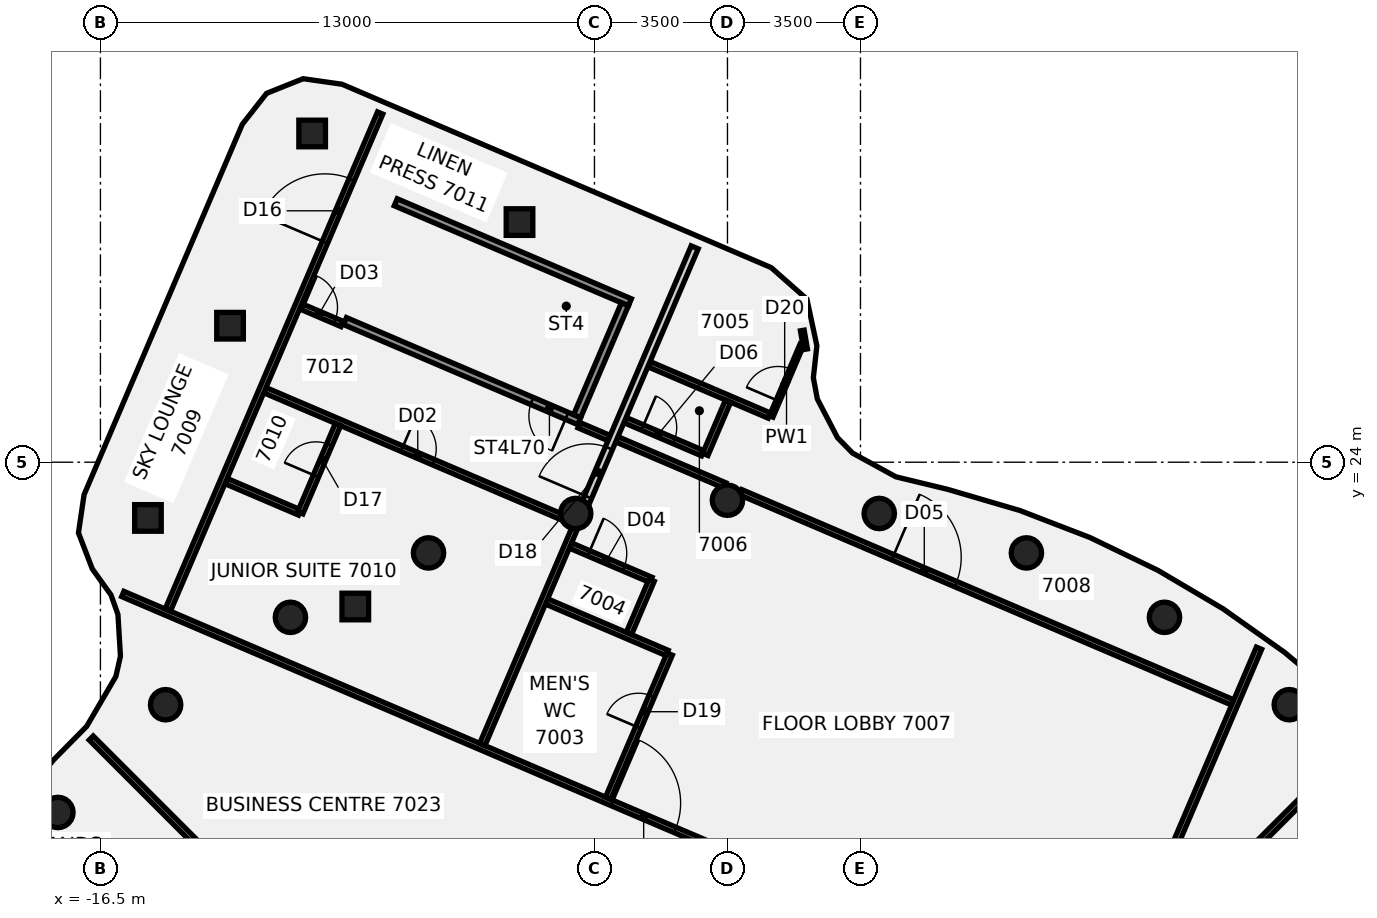
"""IFC4 building model, lengths in metres.
Left out: names, types, materials, properties, quantities, classifications, styles, units other than length and angle.
Written with IfcOpenShell. Run it as: python <this file> out.ifc"""

import sys

from ifc_helpers import new_model, si_unit, direction, frame, frame_2d, origin, origin_2d, place, context, subcontext, project, spatial, polyline, rectangle, circle, outline, extrude, element, fill, save


model = new_model("IFC4")
c1 = context("Model", 3, precision=1e-05, world=origin(), true_north=direction((0.0, 1.0)))
c2 = subcontext(c1, "Body", "Model", "MODEL_VIEW")
j1 = project(units=[si_unit("LENGTHUNIT", "METRE"), si_unit("PLANEANGLEUNIT", "RADIAN")], contexts=[c1])
p1 = place(None, origin())
s1 = spatial("IfcSite", under=j1, at=p1, CompositionType="ELEMENT")
p2 = place(p1, origin())
s2 = spatial("IfcBuilding", under=s1, at=p2, CompositionType="ELEMENT")
p3 = place(p2, frame((0.0, 0.0, 274.8)))
s3 = spatial("IfcBuildingStorey", under=s2, at=p3, CompositionType="ELEMENT", Elevation=274.8)
for number, where, z_axis, x_axis in (
    (1, (14.784, 17.619, -0.14), (0.0, 0.0, 1.0), (1.0, 0.0, 0.0)),
    (2, (11.5, 19.919, -0.14), (0.0, 0.0, 1.0), (1.0, 0.0, 0.0)),
    (3, (7.866, 21.613, -0.14), (0.0, 0.0, 1.0), (1.0, 0.0, 0.0)),
    (4, (3.994, 22.651, -0.14), (0.0, 0.0, 1.0), (1.0, 0.0, 0.0)),
    (5, (0.0, 23.0, -0.14), (0.0, 0.0, 1.0), (1.0, 0.0, 0.0)),
    (6, (-3.994, 22.651, -0.14), (0.0, 0.0, 1.0), (1.0, 0.0, 0.0)),
    (7, (-7.866, 21.613, -0.14), (0.0, 0.0, 1.0), (1.0, 0.0, 0.0)),
    (8, (-11.5, 19.919, -0.14), (0.0, 0.0, 1.0), (1.0, 0.0, 0.0)),
    (9, (-14.784, 17.619, -0.14), (0.0, 0.0, 1.0), (1.0, 0.0, 0.0)),
    (10, (-17.619, 14.784, -0.14), (0.0, 0.0, 1.0), (1.0, 0.0, 0.0)),
):
    element("IfcColumn", number, at=place(p3, frame(where, z_axis=z_axis, x_axis=x_axis)), inside=s3, PredefinedType="COLUMN", context=c2, shape_type="SweptSolid", body=[
        extrude(circle(Radius=0.4, at=origin_2d()), origin(), (0.0, 0.0, 1.0), 3.56),
    ])
p4 = place(p3, frame((-9.793, 20.203, -0.139), z_axis=(0.00968280735, -0.049993501778, 0.998702604894), x_axis=(0.392404503784, 0.918824615381, 0.042190420475)))
e11 = element("IfcColumn", 11, at=p4, inside=s3, PredefinedType="COLUMN", context=c2, shape_type="SweptSolid", body=[
    extrude(rectangle(XDim=0.7, YDim=0.7, at=origin_2d()), origin(), (0.0, 0.0, 1.0), 3.555),
])
p5 = place(p3, frame((-5.472, 30.319, -0.139), z_axis=(-0.042304996766, -0.02843225432, 0.998700102214), x_axis=(0.919317607223, -0.392535504422, 0.02776715357)))
e12 = element("IfcColumn", 12, at=p5, inside=s3, PredefinedType="COLUMN", context=c2, shape_type="SweptSolid", body=[
    extrude(rectangle(XDim=0.7, YDim=0.7, at=origin_2d()), origin(), (0.0, 0.0, 1.0), 3.555),
])
p6 = place(p3, frame((-10.928, 32.649, -0.137), z_axis=(0.039199198447, -0.093913316068, 0.994808379491), x_axis=(0.394304854241, 0.916236072935, 0.07095872445)))
e13 = element("IfcColumn", 13, at=p6, inside=s3, PredefinedType="COLUMN", context=c2, shape_type="SweptSolid", body=[
    extrude(rectangle(XDim=0.7, YDim=0.7, at=origin_2d()), origin(), (0.0, 0.0, 1.0), 3.556),
])
p7 = place(p3, frame((-13.089, 27.592, -0.137), z_axis=(0.064865598105, -0.104414454334, 0.992416281562), x_axis=(0.395430388094, 0.91578583263, 0.070506148144)))
e14 = element("IfcColumn", 14, at=p7, inside=s3, PredefinedType="COLUMN", context=c2, shape_type="SweptSolid", body=[
    extrude(rectangle(XDim=0.7, YDim=0.7, at=origin_2d()), origin(), (0.0, 0.0, 1.0), 3.568),
])
p8 = place(p3, frame((-15.25, 22.534, -0.137), z_axis=(0.09044064582, -0.114839855468, 0.98925845823), x_axis=(0.396148848122, 0.915509402061, 0.070061579126)))
e15 = element("IfcColumn", 15, at=p8, inside=s3, PredefinedType="COLUMN", context=c2, shape_type="SweptSolid", body=[
    extrude(rectangle(XDim=0.7, YDim=0.7, at=origin_2d()), origin(), (0.0, 0.0, 1.0), 3.582),
])
p9 = place(p3, frame((-16.743, 16.743, 0.0), z_axis=(0.0, 0.0, 1.0), x_axis=(0.707106781187, -0.707106781187, 0.0)))
e16 = element("IfcWall", 16, at=p9, inside=s3, PredefinedType="PARTITIONING", context=c2, shape_type="SweptSolid", body=[
    extrude(rectangle(XDim=6.694, YDim=0.15, at=frame_2d((3.347, 0.0))), origin(), (0.0, 0.0, 1.0), 2.824),
])
p10 = place(p3, frame((-15.911, 20.533, 0.0), z_axis=(0.0, 0.0, 1.0), x_axis=(0.919595802133, -0.392865830405, 0.0)))
e17 = element("IfcWall", 17, at=p10, inside=s3, PredefinedType="PARTITIONING", context=c2, shape_type="SweptSolid", body=[
    extrude(rectangle(XDim=21.654, YDim=0.15, at=frame_2d((10.827, 0.0))), origin(), (0.0, 0.0, 1.0), 2.824),
])
p11 = place(p10, frame((14.005, 0.0, 0.0)))
e18 = element("IfcOpeningElement", 18, at=p11, cuts=e17, PredefinedType="OPENING", context=c2, shape_type="SweptSolid", body=[
    extrude(rectangle(XDim=1.8, YDim=2.1, at=frame_2d((0.9, 1.05))), frame((0.0, 0.085, 0.0), z_axis=(0.0, -1.0, 0.0), x_axis=(1.0, 0.0, 0.0)), (0.0, 0.0, 1.0), 0.17),
])
p12 = place(p3, frame((-13.195, 23.504, 0.0), z_axis=(0.0, 0.0, 1.0), x_axis=(0.919678202956, -0.392672895687, 0.0)))
e19 = element("IfcWall", 19, at=p12, inside=s3, PredefinedType="PARTITIONING", context=c2, shape_type="SweptSolid", body=[
    extrude(rectangle(XDim=2.104, YDim=0.15, at=frame_2d((1.052, 0.0))), origin(), (0.0, 0.0, 1.0), 2.824),
])
p13 = place(p3, frame((-12.173, 25.896, 0.0), z_axis=(0.0, 0.0, 1.0), x_axis=(0.919645111199, -0.392750390767, 0.0)))
e20 = element("IfcWall", 20, at=p13, inside=s3, PredefinedType="PARTITIONING", context=c2, shape_type="SweptSolid", body=[
    extrude(rectangle(XDim=8.472, YDim=0.15, at=frame_2d((4.236, 0.0))), origin(), (0.0, 0.0, 1.0), 2.824),
])
p14 = place(p13, frame((3.925, 0.0, 0.0)))
e21 = element("IfcOpeningElement", 21, at=p14, cuts=e20, PredefinedType="OPENING", context=c2, shape_type="SweptSolid", body=[
    extrude(rectangle(XDim=0.9, YDim=2.1, at=frame_2d((0.45, 1.05))), frame((0.0, 0.085, 0.0), z_axis=(0.0, -1.0, 0.0), x_axis=(1.0, 0.0, 0.0)), (0.0, 0.0, 1.0), 0.17),
])
p15 = place(p3, frame((-11.23, 28.103, 0.0), z_axis=(0.0, 0.0, 1.0), x_axis=(0.919613431155, -0.392824562927, 0.0)))
e22 = element("IfcWall", 22, at=p15, inside=s3, PredefinedType="PARTITIONING", context=c2, shape_type="SweptSolid", body=[
    extrude(rectangle(XDim=1.185, YDim=0.15, at=frame_2d((0.592, 0.0))), origin(), (0.0, 0.0, 1.0), 2.824),
])
p16 = place(p15, frame((0.075, 0.0, 0.0)))
e23 = element("IfcOpeningElement", 23, at=p16, cuts=e22, PredefinedType="OPENING", context=c2, shape_type="SweptSolid", body=[
    extrude(rectangle(XDim=0.9, YDim=2.1, at=frame_2d((0.45, 1.05))), frame((0.0, 0.085, 0.0), z_axis=(0.0, -1.0, 0.0), x_axis=(1.0, 0.0, 0.0)), (0.0, 0.0, 1.0), 0.17),
])
p17 = place(p3, frame((-3.906, 24.973, 0.0), z_axis=(0.0, 0.0, 1.0), x_axis=(0.919526501885, -0.393028004512, 0.0)))
e24 = element("IfcWall", 24, at=p17, inside=s3, PredefinedType="PARTITIONING", context=c2, shape_type="SweptSolid", body=[
    extrude(rectangle(XDim=0.86, YDim=0.15, at=frame_2d((0.43, 0.0))), origin(), (0.0, 0.0, 1.0), 2.824),
])
p18 = place(p3, frame((-4.761, 20.336, 0.0), z_axis=(0.0, 0.0, 1.0), x_axis=(0.91960570613, -0.392842646938, 0.0)))
e25 = element("IfcWall", 25, at=p18, inside=s3, PredefinedType="PARTITIONING", context=c2, shape_type="SweptSolid", body=[
    extrude(rectangle(XDim=3.449, YDim=0.15, at=frame_2d((1.725, 0.0))), origin(), (0.0, 0.0, 1.0), 2.824),
])
p19 = place(p3, frame((-4.128, 21.807, 0.0), z_axis=(0.0, 0.0, 1.0), x_axis=(0.919556307153, -0.392958264929, 0.0)))
e26 = element("IfcWall", 26, at=p19, inside=s3, PredefinedType="PARTITIONING", context=c2, shape_type="SweptSolid", body=[
    extrude(rectangle(XDim=2.3, YDim=0.15, at=frame_2d((1.15, 0.0))), origin(), (0.0, 0.0, 1.0), 2.824),
])
p20 = place(p19, frame((0.52, 0.0, 0.0)))
e27 = element("IfcOpeningElement", 27, at=p20, cuts=e26, PredefinedType="OPENING", context=c2, shape_type="SweptSolid", body=[
    extrude(rectangle(XDim=1.0, YDim=2.1, at=frame_2d((0.5, 1.05))), frame((0.0, 0.085, 0.0), z_axis=(0.0, -1.0, 0.0), x_axis=(1.0, 0.0, 0.0)), (0.0, 0.0, 1.0), 0.17),
])
p21 = place(p3, frame((-2.911, 24.603, 0.0), z_axis=(0.0, 0.0, 1.0), x_axis=(0.919582336427, -0.392897348593, 0.0)))
e28 = element("IfcWall", 28, at=p21, inside=s3, PredefinedType="PARTITIONING", context=c2, shape_type="SweptSolid", body=[
    extrude(rectangle(XDim=3.086, YDim=0.15, at=frame_2d((1.543, 0.0))), origin(), (0.0, 0.0, 1.0), 2.824),
])
p22 = place(p3, frame((0.351, 23.209, 0.0), z_axis=(0.0, 0.0, 1.0), x_axis=(0.919588500122, -0.392882922056, 0.0)))
e29 = element("IfcWall", 29, at=p22, inside=s3, PredefinedType="PARTITIONING", context=c2, shape_type="SweptSolid", body=[
    extrude(rectangle(XDim=14.077, YDim=0.15, at=frame_2d((7.038, 0.0))), origin(), (0.0, 0.0, 1.0), 2.824),
])
p23 = place(p22, frame((4.35, 0.0, 0.0)))
e30 = element("IfcOpeningElement", 30, at=p23, cuts=e29, PredefinedType="OPENING", context=c2, shape_type="SweptSolid", body=[
    extrude(rectangle(XDim=1.8, YDim=2.1, at=frame_2d((0.9, 1.05))), frame((0.0, 0.085, 0.0), z_axis=(0.0, -1.0, 0.0), x_axis=(1.0, 0.0, 0.0)), (0.0, 0.0, 1.0), 0.17),
])
p24 = place(p3, frame((-2.695, 25.109, 0.0), z_axis=(0.0, 0.0, 1.0), x_axis=(0.919571099673, -0.392923647349, 0.0)))
e31 = element("IfcWall", 31, at=p24, inside=s3, PredefinedType="PARTITIONING", context=c2, shape_type="SweptSolid", body=[
    extrude(rectangle(XDim=2.22, YDim=0.15, at=frame_2d((1.11, 0.0))), origin(), (0.0, 0.0, 1.0), 2.824),
])
p25 = place(p24, frame((0.5, 0.0, 0.0)))
e32 = element("IfcOpeningElement", 32, at=p25, cuts=e31, PredefinedType="OPENING", context=c2, shape_type="SweptSolid", body=[
    extrude(rectangle(XDim=0.9, YDim=2.1, at=frame_2d((0.45, 1.05))), frame((0.0, 0.085, 0.0), z_axis=(0.0, -1.0, 0.0), x_axis=(1.0, 0.0, 0.0)), (0.0, 0.0, 1.0), 0.17),
])
p26 = place(p3, frame((-2.062, 26.579, 0.0), z_axis=(0.0, 0.0, 1.0), x_axis=(0.919588532032, -0.392882847366, 0.0)))
e33 = element("IfcWall", 33, at=p26, inside=s3, PredefinedType="PARTITIONING", context=c2, shape_type="SweptSolid", body=[
    extrude(rectangle(XDim=3.441, YDim=0.15, at=frame_2d((1.72, 0.0))), origin(), (0.0, 0.0, 1.0), 2.824),
])
p27 = place(p3, frame((12.01, 12.01, 0.0), z_axis=(0.0, 0.0, 1.0), x_axis=(0.707106781187, 0.707106781187, 0.0)))
e34 = element("IfcWall", 34, at=p27, inside=s3, PredefinedType="PARTITIONING", context=c2, shape_type="SweptSolid", body=[
    extrude(rectangle(XDim=6.691, YDim=0.15, at=frame_2d((3.345, 0.0))), origin(), (0.0, 0.0, 1.0), 2.824),
])
p28 = place(p3, frame((-14.728, 20.109, 0.0), z_axis=(0.0, 0.0, 1.0), x_axis=(0.392937170338, 0.919565321316, 0.0)))
e35 = element("IfcWall", 35, at=p28, inside=s3, PredefinedType="PARTITIONING", context=c2, shape_type="SweptSolid", body=[
    extrude(rectangle(XDim=14.224, YDim=0.15, at=frame_2d((7.112, 0.0))), origin(), (0.0, 0.0, 1.0), 2.824),
])
p29 = place(p28, frame((10.525, 0.0, 0.0)))
e36 = element("IfcOpeningElement", 36, at=p29, cuts=e35, PredefinedType="OPENING", context=c2, shape_type="SweptSolid", body=[
    extrude(rectangle(XDim=1.8, YDim=2.1, at=frame_2d((0.9, 1.05))), frame((0.0, 0.085, 0.0), z_axis=(0.0, -1.0, 0.0), x_axis=(1.0, 0.0, 0.0)), (0.0, 0.0, 1.0), 0.17),
])
p30 = place(p3, frame((-11.241, 22.67, 0.0), z_axis=(0.0, 0.0, 1.0), x_axis=(0.3930089689, 0.919534637936, 0.0)))
e37 = element("IfcWall", 37, at=p30, inside=s3, PredefinedType="PARTITIONING", context=c2, shape_type="SweptSolid", body=[
    extrude(rectangle(XDim=2.525, YDim=0.15, at=frame_2d((1.263, 0.0))), origin(), (0.0, 0.0, 1.0), 2.824),
])
p31 = place(p30, frame((1.05, 0.0, 0.0)))
e38 = element("IfcOpeningElement", 38, at=p31, cuts=e37, PredefinedType="OPENING", context=c2, shape_type="SweptSolid", body=[
    extrude(rectangle(XDim=0.9, YDim=2.1, at=frame_2d((0.45, 1.05))), frame((0.0, 0.085, 0.0), z_axis=(0.0, -1.0, 0.0), x_axis=(1.0, 0.0, 0.0)), (0.0, 0.0, 1.0), 0.17),
])
p32 = place(p3, frame((-6.45, 16.573, 0.0), z_axis=(0.0, 0.0, 1.0), x_axis=(0.392889649243, 0.919585625985, 0.0)))
e39 = element("IfcWall", 39, at=p32, inside=s3, PredefinedType="PARTITIONING", context=c2, shape_type="SweptSolid", body=[
    extrude(rectangle(XDim=6.326, YDim=0.15, at=frame_2d((3.163, 0.0))), origin(), (0.0, 0.0, 1.0), 2.824),
])
p33 = place(p3, frame((-3.788, 22.804, 0.0), z_axis=(0.0, 0.0, 1.0), x_axis=(0.392862746148, 0.91959711977, 0.0)))
e40 = element("IfcWall", 40, at=p33, inside=s3, PredefinedType="PARTITIONING", context=c2, shape_type="SweptSolid", body=[
    extrude(rectangle(XDim=7.448, YDim=0.2, at=frame_2d((3.724, 0.0))), origin(), (0.0, 0.0, 1.0), 2.824),
])
p34 = place(p33, frame((0.303, 0.0, 0.0)))
e41 = element("IfcOpeningElement", 41, at=p34, cuts=e40, PredefinedType="OPENING", context=c2, shape_type="SweptSolid", body=[
    extrude(rectangle(XDim=1.4, YDim=2.1, at=frame_2d((0.7, 1.05))), frame((0.0, 0.11, 0.0), z_axis=(0.0, -1.0, 0.0), x_axis=(1.0, 0.0, 0.0)), (0.0, 0.0, 1.0), 0.22),
])
p35 = place(p3, frame((-3.14, 15.159, 0.0), z_axis=(0.0, 0.0, 1.0), x_axis=(0.392854606295, 0.919600597168, 0.0)))
e42 = element("IfcWall", 42, at=p35, inside=s3, PredefinedType="PARTITIONING", context=c2, shape_type="SweptSolid", body=[
    extrude(rectangle(XDim=4.125, YDim=0.15, at=frame_2d((2.062, 0.0))), origin(), (0.0, 0.0, 1.0), 2.824),
])
p36 = place(p35, frame((2.025, 0.0, 0.0)))
e43 = element("IfcOpeningElement", 43, at=p36, cuts=e42, PredefinedType="OPENING", context=c2, shape_type="SweptSolid", body=[
    extrude(rectangle(XDim=0.9, YDim=2.1, at=frame_2d((0.45, 1.05))), frame((0.0, 0.085, 0.0), z_axis=(0.0, -1.0, 0.0), x_axis=(1.0, 0.0, 0.0)), (0.0, 0.0, 1.0), 0.17),
])
p37 = place(p3, frame((1.152, 25.205, 0.0), z_axis=(0.0, 0.0, 1.0), x_axis=(0.392869839525, 0.919594089363, 0.0)))
e44 = element("IfcWall", 44, at=p37, inside=s3, PredefinedType="PARTITIONING", context=c2, shape_type="SweptSolid", body=[
    extrude(rectangle(XDim=2.05, YDim=0.1, at=frame_2d((1.025, 0.0))), origin(), (0.0, 0.0, 1.0), 2.824),
])
p38 = place(p37, frame((0.45, 0.0, 0.0)))
e45 = element("IfcOpeningElement", 45, at=p38, cuts=e44, PredefinedType="OPENING", context=c2, shape_type="SweptSolid", body=[
    extrude(rectangle(XDim=0.9, YDim=2.1, at=frame_2d((0.45, 1.05))), frame((0.0, 0.06, 0.0), z_axis=(0.0, -1.0, 0.0), x_axis=(1.0, 0.0, 0.0)), (0.0, 0.0, 1.0), 0.12),
])
p39 = place(p3, frame((-2.592, 19.497, 0.0), z_axis=(0.0, 0.0, 1.0), x_axis=(0.39231007283, 0.919833031999, 0.0)))
e46 = element("IfcWall", 46, at=p39, inside=s3, PredefinedType="PARTITIONING", context=c2, shape_type="SweptSolid", body=[
    extrude(rectangle(XDim=1.52, YDim=0.15, at=frame_2d((0.76, 0.0))), origin(), (0.0, 0.0, 1.0), 2.824),
])
p40 = place(p3, frame((-0.583, 24.206, 0.0), z_axis=(0.0, 0.0, 1.0), x_axis=(0.392489240169, 0.919756596253, 0.0)))
e47 = element("IfcWall", 47, at=p40, inside=s3, PredefinedType="PARTITIONING", context=c2, shape_type="SweptSolid", body=[
    extrude(rectangle(XDim=1.525, YDim=0.15, at=frame_2d((0.763, 0.0))), origin(), (0.0, 0.0, 1.0), 2.824),
])
p41 = place(p3, frame((10.946, 11.987, 0.0), z_axis=(0.0, 0.0, 1.0), x_axis=(0.392849254325, 0.919602883519, 0.0)))
e48 = element("IfcWall", 48, at=p41, inside=s3, PredefinedType="PARTITIONING", context=c2, shape_type="SweptSolid", body=[
    extrude(rectangle(XDim=7.74, YDim=0.15, at=frame_2d((3.87, 0.0))), origin(), (0.0, 0.0, 1.0), 2.824),
])
p42 = place(p3, frame((2.054, 26.973, 0.0), z_axis=(0.0, 0.0, 1.0), x_axis=(-0.168516403879, 0.985698849357, 0.0)))
e49 = element("IfcWall", 49, at=p42, inside=s3, PredefinedType="PARTITIONING", context=c2, shape_type="SweptSolid", body=[
    extrude(rectangle(XDim=0.5, YDim=0.1, at=frame_2d((0.25, 0.0))), origin(), (0.0, 0.0, 1.0), 2.824),
])
p43 = place(p3, frame((-3.903, 25.081, -0.14), z_axis=(0.0, 0.0, 1.0), x_axis=(-0.919604285577, 0.392845972295, 0.0)))
e50 = element("IfcWall", 50, at=p43, inside=s3, PredefinedType="SHEAR", context=c2, shape_type="SweptSolid", body=[
    extrude(rectangle(XDim=6.7, YDim=0.2, at=frame_2d((3.35, 0.0))), origin(), (0.0, 0.0, 1.0), 3.064),
])
p44 = place(p43, frame((0.35, 0.0, 0.0)))
e51 = element("IfcOpeningElement", 51, at=p44, cuts=e50, PredefinedType="OPENING", context=c2, shape_type="SweptSolid", body=[
    extrude(rectangle(XDim=1.0, YDim=2.1, at=frame_2d((0.5, 1.05))), frame((0.0, 0.11, 0.0), z_axis=(0.0, -1.0, 0.0), x_axis=(1.0, 0.0, 0.0)), (0.0, 0.0, 1.0), 0.22),
])
p45 = place(p3, frame((-2.568, 28.208, -0.14), z_axis=(0.0, 0.0, 1.0), x_axis=(-0.919604285577, 0.392845972295, 0.0)))
e52 = element("IfcWall", 52, at=p45, inside=s3, PredefinedType="SHEAR", context=c2, shape_type="SweptSolid", body=[
    extrude(rectangle(XDim=6.7, YDim=0.2, at=frame_2d((3.35, 0.0))), origin(), (0.0, 0.0, 1.0), 3.064),
])
p46 = place(p3, frame((-2.699, 28.155, -0.14), z_axis=(0.0, 0.0, 1.0), x_axis=(-0.392823319404, -0.919613962341, 0.0)))
e53 = element("IfcWall", 53, at=p46, inside=s3, PredefinedType="SHEAR", context=c2, shape_type="SweptSolid", body=[
    extrude(rectangle(XDim=3.2, YDim=0.2, at=frame_2d((1.6, 0.0))), origin(), (0.0, 0.0, 1.0), 3.56),
])
p47 = place(p3, frame((0.0, 0.0, -0.14)))
e54 = element("IfcWall", 54, at=p47, inside=s3, PredefinedType="SHEAR", context=c2, shape_type="SweptSolid", body=[
    extrude(outline(polyline([(-8.584, 30.669), (-8.768, 30.748), (-10.025, 27.805), (-9.841, 27.727), (-8.584, 30.669)])), origin(), (0.0, 0.0, 1.0), 3.56),
])
p48 = place(p11, origin())
e55 = element("IfcDoor", 55, at=p48, inside=s3, OperationType="DOUBLE_DOOR_SINGLE_SWING", PredefinedType="DOOR", context=c2, shape_type="SweptSolid", body=[
    extrude(rectangle(XDim=1.8, YDim=2.1, at=frame_2d((0.9, 1.05))), frame((0.0, 0.025, 0.0), z_axis=(0.0, -1.0, 0.0), x_axis=(1.0, 0.0, 0.0)), (0.0, 0.0, 1.0), 0.05),
])
fill(e18, e55)
p49 = place(p14, frame((0.9, 0.0, 0.0), z_axis=(0.0, 0.0, 1.0), x_axis=(-1.0, 0.0, 0.0)))
e56 = element("IfcDoor", 56, at=p49, inside=s3, OperationType="SINGLE_SWING_RIGHT", PredefinedType="DOOR", context=c2, shape_type="SweptSolid", body=[
    extrude(rectangle(XDim=0.9, YDim=2.1, at=frame_2d((0.45, 1.05))), frame((0.0, 0.025, 0.0), z_axis=(0.0, -1.0, 0.0), x_axis=(1.0, 0.0, 0.0)), (0.0, 0.0, 1.0), 0.05),
])
fill(e21, e56)
p50 = place(p16, origin())
e57 = element("IfcDoor", 57, at=p50, inside=s3, OperationType="SINGLE_SWING_RIGHT", PredefinedType="DOOR", context=c2, shape_type="SweptSolid", body=[
    extrude(rectangle(XDim=0.9, YDim=2.1, at=frame_2d((0.45, 1.05))), frame((0.0, 0.025, 0.0), z_axis=(0.0, -1.0, 0.0), x_axis=(1.0, 0.0, 0.0)), (0.0, 0.0, 1.0), 0.05),
])
fill(e23, e57)
p51 = place(p20, frame((1.0, 0.0, 0.0), z_axis=(0.0, 0.0, 1.0), x_axis=(-1.0, 0.0, 0.0)))
e58 = element("IfcDoor", 58, at=p51, inside=s3, OperationType="SINGLE_SWING_LEFT", PredefinedType="DOOR", context=c2, shape_type="SweptSolid", body=[
    extrude(rectangle(XDim=1.0, YDim=2.1, at=frame_2d((0.5, 1.05))), frame((0.0, 0.025, 0.0), z_axis=(0.0, -1.0, 0.0), x_axis=(1.0, 0.0, 0.0)), (0.0, 0.0, 1.0), 0.05),
])
fill(e27, e58)
p52 = place(p23, origin())
e59 = element("IfcDoor", 59, at=p52, inside=s3, OperationType="DOUBLE_DOOR_SINGLE_SWING", PredefinedType="DOOR", context=c2, shape_type="SweptSolid", body=[
    extrude(rectangle(XDim=1.8, YDim=2.1, at=frame_2d((0.9, 1.05))), frame((0.0, 0.025, 0.0), z_axis=(0.0, -1.0, 0.0), x_axis=(1.0, 0.0, 0.0)), (0.0, 0.0, 1.0), 0.05),
])
fill(e30, e59)
p53 = place(p25, origin())
e60 = element("IfcDoor", 60, at=p53, inside=s3, OperationType="SINGLE_SWING_RIGHT", PredefinedType="DOOR", context=c2, shape_type="SweptSolid", body=[
    extrude(rectangle(XDim=0.9, YDim=2.1, at=frame_2d((0.45, 1.05))), frame((0.0, 0.025, 0.0), z_axis=(0.0, -1.0, 0.0), x_axis=(1.0, 0.0, 0.0)), (0.0, 0.0, 1.0), 0.05),
])
fill(e32, e60)
p54 = place(p29, origin())
e61 = element("IfcDoor", 61, at=p54, inside=s3, OperationType="DOUBLE_DOOR_SINGLE_SWING", PredefinedType="DOOR", context=c2, shape_type="SweptSolid", body=[
    extrude(rectangle(XDim=1.8, YDim=2.1, at=frame_2d((0.9, 1.05))), frame((0.0, 0.025, 0.0), z_axis=(0.0, -1.0, 0.0), x_axis=(1.0, 0.0, 0.0)), (0.0, 0.0, 1.0), 0.05),
])
fill(e36, e61)
p55 = place(p31, origin())
e62 = element("IfcDoor", 62, at=p55, inside=s3, OperationType="SINGLE_SWING_LEFT", PredefinedType="DOOR", context=c2, shape_type="SweptSolid", body=[
    extrude(rectangle(XDim=0.9, YDim=2.1, at=frame_2d((0.45, 1.05))), frame((0.0, 0.025, 0.0), z_axis=(0.0, -1.0, 0.0), x_axis=(1.0, 0.0, 0.0)), (0.0, 0.0, 1.0), 0.05),
])
fill(e38, e62)
p56 = place(p34, frame((1.4, 0.0, 0.0), z_axis=(0.0, 0.0, 1.0), x_axis=(-1.0, 0.0, 0.0)))
e63 = element("IfcDoor", 63, at=p56, inside=s3, OperationType="DOUBLE_DOOR_SINGLE_SWING", PredefinedType="DOOR", context=c2, shape_type="SweptSolid", body=[
    extrude(rectangle(XDim=1.4, YDim=2.1, at=frame_2d((0.7, 1.05))), frame((0.0, 0.025, 0.0), z_axis=(0.0, -1.0, 0.0), x_axis=(1.0, 0.0, 0.0)), (0.0, 0.0, 1.0), 0.05),
])
fill(e41, e63)
p57 = place(p36, origin())
e64 = element("IfcDoor", 64, at=p57, inside=s3, OperationType="SINGLE_SWING_LEFT", PredefinedType="DOOR", context=c2, shape_type="SweptSolid", body=[
    extrude(rectangle(XDim=0.9, YDim=2.1, at=frame_2d((0.45, 1.05))), frame((0.0, 0.025, 0.0), z_axis=(0.0, -1.0, 0.0), x_axis=(1.0, 0.0, 0.0)), (0.0, 0.0, 1.0), 0.05),
])
fill(e43, e64)
p58 = place(p38, origin())
e65 = element("IfcDoor", 65, at=p58, inside=s3, OperationType="SINGLE_SWING_RIGHT", PredefinedType="DOOR", context=c2, shape_type="SweptSolid", body=[
    extrude(rectangle(XDim=0.9, YDim=2.1, at=frame_2d((0.45, 1.05))), frame((0.0, 0.025, 0.0), z_axis=(0.0, -1.0, 0.0), x_axis=(1.0, 0.0, 0.0)), (0.0, 0.0, 1.0), 0.05),
])
fill(e45, e65)
p59 = place(p44, origin())
e66 = element("IfcDoor", 66, at=p59, inside=s3, OperationType="SINGLE_SWING_LEFT", PredefinedType="DOOR", context=c2, shape_type="SweptSolid", body=[
    extrude(rectangle(XDim=1.0, YDim=2.1, at=frame_2d((0.5, 1.05))), frame((0.0, 0.025, 0.0), z_axis=(0.0, -1.0, 0.0), x_axis=(1.0, 0.0, 0.0)), (0.0, 0.0, 1.0), 0.05),
])
fill(e51, e66)
save(model, sys.argv[1])
